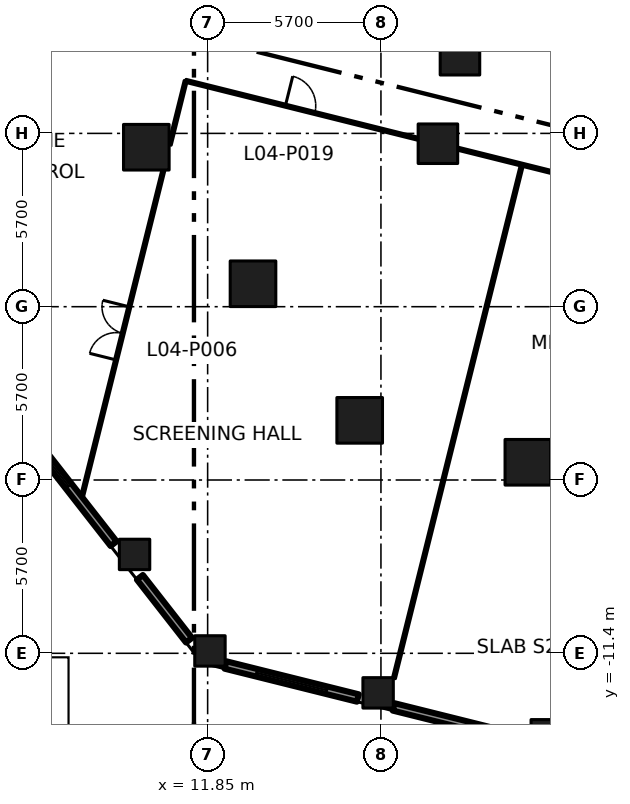
"""IFC4 building model, lengths in metres.
Left out: names, types, materials, properties, quantities, classifications, styles, units other than length and angle.
Written with IfcOpenShell. Run it as: python <this file> out.ifc"""

import sys

from ifc_helpers import new_model, si_unit, direction, frame, frame_2d, origin, origin_2d, place, context, subcontext, project, spatial, rectangle, extrude, element, fill, save


model = new_model("IFC4")
c1 = context("Model", 3, precision=1e-05, world=origin(), true_north=direction((0.0, 1.0)))
c2 = subcontext(c1, "Body", "Model", "MODEL_VIEW")
j1 = project(units=[si_unit("LENGTHUNIT", "METRE"), si_unit("PLANEANGLEUNIT", "RADIAN")], contexts=[c1])
p1 = place(None, origin())
s1 = spatial("IfcSite", under=j1, at=p1, CompositionType="ELEMENT")
p2 = place(p1, origin())
s2 = spatial("IfcBuilding", under=s1, at=p2, CompositionType="ELEMENT")
p3 = place(p2, frame((0.0, 0.0, 23.4)))
s3 = spatial("IfcBuildingStorey", under=s2, at=p3, CompositionType="ELEMENT", Elevation=23.4)
for number, where, z_axis, x_axis in (
    (1, (16.851, -3.738, 0.0), (0.0, 0.0, 1.0), (1.0, 0.0, 0.0)),
    (2, (13.342, 0.754, 0.0), (0.0, 0.0, 1.0), (1.0, 0.0, 0.0)),
    (3, (9.833, 5.245, 0.0), (0.0, 0.0, 1.0), (1.0, 0.0, 0.0)),
    (4, (22.382, -5.117, 0.0), (0.0, 0.0, 1.0), (1.0, 0.0, 0.0)),
):
    element("IfcColumn", number, at=place(p3, frame(where, z_axis=z_axis, x_axis=x_axis)), inside=s3, PredefinedType="COLUMN", context=c2, shape_type="SweptSolid", body=[
        extrude(rectangle(XDim=1.5, YDim=1.5, at=origin_2d()), origin(), (0.0, 0.0, 1.0), 4.8),
    ])
for number, where, z_axis, x_axis in (
    (5, (19.424, 5.36, 0.0), (0.0, 0.0, 1.0), (1.0, 0.0, 0.0)),
    (6, (20.149, 8.271, 0.0), (0.0, 0.0, 1.0), (1.0, 0.0, 0.0)),
):
    element("IfcColumn", number, at=place(p3, frame(where, z_axis=z_axis, x_axis=x_axis)), inside=s3, PredefinedType="COLUMN", context=c2, shape_type="SweptSolid", body=[
        extrude(rectangle(XDim=1.3, YDim=1.3, at=origin_2d()), origin(), (0.0, 0.0, 1.0), 4.8),
    ])
for number, where, z_axis, x_axis in (
    (7, (9.446, -8.148, 0.0), (0.0, 0.0, 1.0), (1.0, 0.0, 0.0)),
    (8, (11.926, -11.322, 0.0), (0.0, 0.0, 1.0), (1.0, 0.0, 0.0)),
    (9, (17.457, -12.701, 0.0), (0.0, 0.0, 1.0), (1.0, 0.0, 0.0)),
    (10, (22.987, -14.08, 0.0), (0.0, 0.0, 1.0), (1.0, 0.0, 0.0)),
):
    element("IfcColumn", number, at=place(p3, frame(where, z_axis=z_axis, x_axis=x_axis)), inside=s3, PredefinedType="COLUMN", context=c2, shape_type="SweptSolid", body=[
        extrude(rectangle(XDim=1.0, YDim=1.0, at=origin_2d()), origin(), (0.0, 0.0, 1.0), 4.8),
    ])
p4 = place(p3, frame((7.716, -6.257, 0.0), z_axis=(0.0, 0.0, 1.0), x_axis=(0.241891576484, 0.970303285177, 0.0)))
e11 = element("IfcWall", 11, at=p4, inside=s3, PredefinedType="PARTITIONING", context=c2, shape_type="SweptSolid", body=[
    extrude(rectangle(XDim=11.061, YDim=0.1, at=frame_2d((5.53, 0.0))), origin(), (0.0, 0.0, 1.0), 4.35),
])
p5 = place(p4, frame((4.644, 0.0, 0.0)))
e12 = element("IfcOpeningElement", 12, at=p5, cuts=e11, PredefinedType="OPENING", context=c2, shape_type="SweptSolid", body=[
    extrude(rectangle(XDim=1.8, YDim=2.1, at=frame_2d((0.9, 1.05))), frame((0.0, 0.06, 0.0), z_axis=(0.0, -1.0, 0.0), x_axis=(1.0, 0.0, 0.0)), (0.0, 0.0, 1.0), 0.12),
])
p6 = place(p3, frame((10.603, 5.323, 0.0), z_axis=(0.0, 0.0, 1.0), x_axis=(0.241847407238, 0.970314295273, 0.0)))
e13 = element("IfcWall", 13, at=p6, inside=s3, PredefinedType="PARTITIONING", context=c2, shape_type="SweptSolid", body=[
    extrude(rectangle(XDim=2.17, YDim=0.1, at=frame_2d((1.085, 0.0))), origin(), (0.0, 0.0, 1.0), 4.35),
])
p7 = place(p3, frame((11.128, 7.429, 0.0), z_axis=(0.0, 0.0, 1.0), x_axis=(0.970281210621, -0.241980107272, 0.0)))
e14 = element("IfcWall", 14, at=p7, inside=s3, PredefinedType="PARTITIONING", context=c2, shape_type="SweptSolid", body=[
    extrude(rectangle(XDim=7.86, YDim=0.1, at=frame_2d((3.93, 0.0))), origin(), (0.0, 0.0, 1.0), 4.35),
])
p8 = place(p7, frame((3.38, 0.0, 0.0)))
e15 = element("IfcOpeningElement", 15, at=p8, cuts=e14, PredefinedType="OPENING", context=c2, shape_type="SweptSolid", body=[
    extrude(rectangle(XDim=1.0, YDim=2.1, at=frame_2d((0.5, 1.05))), frame((0.0, 0.06, 0.0), z_axis=(0.0, -1.0, 0.0), x_axis=(1.0, 0.0, 0.0)), (0.0, 0.0, 1.0), 0.12),
])
p9 = place(p3, frame((20.094, 5.193, 0.0), z_axis=(0.0, 0.0, 1.0), x_axis=(0.970321828551, -0.241817181023, 0.0)))
e16 = element("IfcWall", 16, at=p9, inside=s3, PredefinedType="PARTITIONING", context=c2, shape_type="SweptSolid", body=[
    extrude(rectangle(XDim=4.318, YDim=0.1, at=frame_2d((2.159, 0.0))), origin(), (0.0, 0.0, 1.0), 4.35),
])
p10 = place(p3, frame((17.977, -12.223, 0.0), z_axis=(0.0, 0.0, 1.0), x_axis=(0.241923428609, 0.970295344053, 0.0)))
e17 = element("IfcWall", 17, at=p10, inside=s3, PredefinedType="PARTITIONING", context=c2, shape_type="SweptSolid", body=[
    extrude(rectangle(XDim=17.361, YDim=0.1, at=frame_2d((8.68, 0.0))), origin(), (0.0, 0.0, 1.0), 4.35),
])
p11 = place(p3, frame((6.113, -4.409, 0.0), z_axis=(0.0, 0.0, 1.0), x_axis=(0.615603242749, -0.788056246417, 0.0)))
e18 = element("IfcWall", 18, at=p11, inside=s3, PredefinedType="SOLIDWALL", context=c2, shape_type="SweptSolid", body=[
    extrude(rectangle(XDim=4.297, YDim=0.25, at=frame_2d((2.148, 0.0))), origin(), (0.0, 0.0, 1.0), 3.45),
])
p12 = place(p11, frame((0.702, 0.0, 0.9)))
e19 = element("IfcOpeningElement", 19, at=p12, cuts=e18, PredefinedType="OPENING", context=c2, shape_type="SweptSolid", body=[
    extrude(rectangle(XDim=1.2, YDim=2.1, at=frame_2d((0.6, 1.05))), frame((0.0, 0.135, 0.0), z_axis=(0.0, -1.0, 0.0), x_axis=(1.0, 0.0, 0.0)), (0.0, 0.0, 1.0), 0.27),
])
p13 = place(p3, frame((9.622, -8.901, 0.0), z_axis=(0.0, 0.0, 1.0), x_axis=(0.615703609525, -0.787977832948, 0.0)))
e20 = element("IfcWall", 20, at=p13, inside=s3, PredefinedType="SOLIDWALL", context=c2, shape_type="SweptSolid", body=[
    extrude(rectangle(XDim=2.625, YDim=0.25, at=frame_2d((1.312, 0.0))), origin(), (0.0, 0.0, 1.0), 3.45),
])
p14 = place(p3, frame((12.436, -11.784, 0.0), z_axis=(0.0, 0.0, 1.0), x_axis=(0.970263990019, -0.242049147224, 0.0)))
e21 = element("IfcWall", 21, at=p14, inside=s3, PredefinedType="SOLIDWALL", context=c2, shape_type="SweptSolid", body=[
    extrude(rectangle(XDim=4.488, YDim=0.25, at=frame_2d((2.244, 0.0))), origin(), (0.0, 0.0, 1.0), 3.45),
])
p15 = place(p14, frame((1.044, 0.0, 0.9)))
e22 = element("IfcOpeningElement", 22, at=p15, cuts=e21, PredefinedType="OPENING", context=c2, shape_type="SweptSolid", body=[
    extrude(rectangle(XDim=2.4, YDim=2.1, at=frame_2d((1.2, 1.05))), frame((0.0, 0.135, 0.0), z_axis=(0.0, -1.0, 0.0), x_axis=(1.0, 0.0, 0.0)), (0.0, 0.0, 1.0), 0.27),
])
p16 = place(p3, frame((17.967, -13.163, 0.0), z_axis=(0.0, 0.0, 1.0), x_axis=(0.970315118421, -0.24184410467, 0.0)))
e23 = element("IfcWall", 23, at=p16, inside=s3, PredefinedType="SOLIDWALL", context=c2, shape_type="SweptSolid", body=[
    extrude(rectangle(XDim=4.486, YDim=0.25, at=frame_2d((2.243, 0.0))), origin(), (0.0, 0.0, 1.0), 3.45),
])
p17 = place(p5, origin())
e24 = element("IfcDoor", 24, at=p17, inside=s3, OperationType="DOUBLE_DOOR_SINGLE_SWING", PredefinedType="DOOR", context=c2, shape_type="SweptSolid", body=[
    extrude(rectangle(XDim=1.8, YDim=2.1, at=frame_2d((0.9, 1.05))), frame((0.0, 0.025, 0.0), z_axis=(0.0, -1.0, 0.0), x_axis=(1.0, 0.0, 0.0)), (0.0, 0.0, 1.0), 0.05),
])
fill(e12, e24)
p18 = place(p8, origin())
e25 = element("IfcDoor", 25, at=p18, inside=s3, OperationType="SINGLE_SWING_LEFT", PredefinedType="DOOR", context=c2, shape_type="SweptSolid", body=[
    extrude(rectangle(XDim=1.0, YDim=2.1, at=frame_2d((0.5, 1.05))), frame((0.0, 0.025, 0.0), z_axis=(0.0, -1.0, 0.0), x_axis=(1.0, 0.0, 0.0)), (0.0, 0.0, 1.0), 0.05),
])
fill(e15, e25)
p19 = place(p12, origin())
e26 = element("IfcWindow", 26, at=p19, inside=s3, PartitioningType="SINGLE_PANEL", PredefinedType="WINDOW", context=c2, shape_type="SweptSolid", body=[
    extrude(rectangle(XDim=1.2, YDim=2.1, at=frame_2d((0.6, 1.05))), frame((0.0, 0.03, 0.0), z_axis=(0.0, -1.0, 0.0), x_axis=(1.0, 0.0, 0.0)), (0.0, 0.0, 1.0), 0.06),
])
fill(e19, e26)
p20 = place(p15, origin())
e27 = element("IfcWindow", 27, at=p20, inside=s3, PartitioningType="DOUBLE_PANEL_VERTICAL", PredefinedType="WINDOW", context=c2, shape_type="SweptSolid", body=[
    extrude(rectangle(XDim=2.4, YDim=2.1, at=frame_2d((1.2, 1.05))), frame((0.0, 0.03, 0.0), z_axis=(0.0, -1.0, 0.0), x_axis=(1.0, 0.0, 0.0)), (0.0, 0.0, 1.0), 0.06),
])
fill(e22, e27)
save(model, sys.argv[1])
